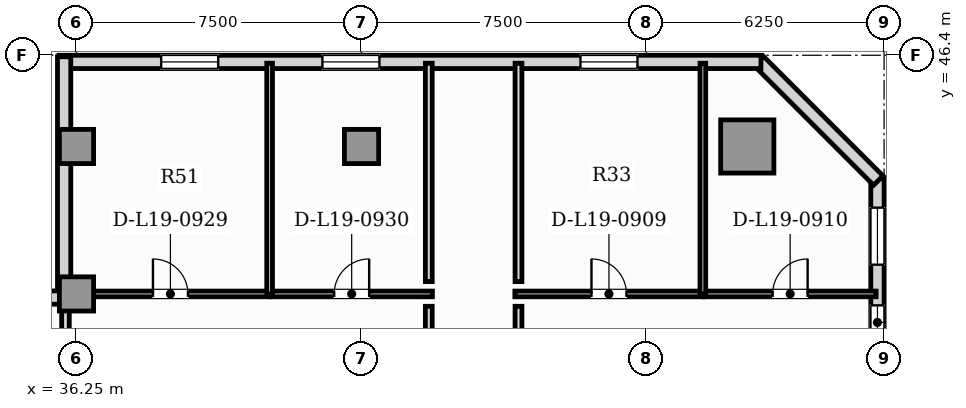
"""IFC4 building model, lengths in metres.
Left out: names, types, materials, properties, quantities, classifications, styles, units other than length and angle.
Written with IfcOpenShell. Run it as: python <this file> out.ifc"""

import sys

from ifc_helpers import new_model, si_unit, direction, frame, frame_2d, origin, origin_2d, place, context, subcontext, project, spatial, rectangle, hollow_rectangle, extrude, element, fill, save


model = new_model("IFC4")
c1 = context("Model", 3, precision=1e-05, world=origin(), true_north=direction((0.0, 1.0)))
c2 = subcontext(c1, "Body", "Model", "MODEL_VIEW")
j1 = project(units=[si_unit("LENGTHUNIT", "METRE"), si_unit("PLANEANGLEUNIT", "RADIAN")], contexts=[c1])
p1 = place(None, origin())
s1 = spatial("IfcSite", under=j1, at=p1, CompositionType="ELEMENT")
p2 = place(p1, origin())
s2 = spatial("IfcBuilding", under=s1, at=p2, CompositionType="ELEMENT")
p3 = place(p2, frame((0.0, 0.0, 81.05)))
s3 = spatial("IfcBuildingStorey", under=s2, at=p3, CompositionType="ELEMENT", Elevation=81.05)
p4 = place(p3, frame((53.9, 44.0, 0.0), z_axis=(0.0, 0.0, 1.0), x_axis=(1.0, 0.0, 0.0)))
e1 = element("IfcColumn", 1, at=p4, inside=s3, PredefinedType="USERDEFINED", context=c2, shape_type="SweptSolid", body=[
    extrude(hollow_rectangle(XDim=1.4, YDim=1.4, WallThickness=0.08, at=origin_2d()), origin(), (0.0, 0.0, 1.0), 3.85),
])
for number, where, z_axis, x_axis in (
    (2, (36.25, 44.0, 0.0), (0.0, 0.0, 1.0), (1.0, 0.0, 0.0)),
    (3, (43.75, 44.0, 0.0), (0.0, 0.0, 1.0), (1.0, 0.0, 0.0)),
    (4, (36.25, 40.12, 0.0), (0.0, 0.0, 1.0), (1.0, 0.0, 0.0)),
):
    element("IfcColumn", number, at=place(p3, frame(where, z_axis=z_axis, x_axis=x_axis)), inside=s3, PredefinedType="COLUMN", context=c2, shape_type="SweptSolid", body=[
        extrude(rectangle(XDim=0.9, YDim=0.9, at=origin_2d()), origin(), (0.0, 0.0, 1.0), 3.85),
    ])
p5 = place(p3, frame((57.325, 3.24, 0.0), z_axis=(0.0, 0.0, 1.0), x_axis=(0.0, 1.0, 0.0)))
e5 = element("IfcWall", 5, at=p5, inside=s3, PredefinedType="SOLIDWALL", context=c2, shape_type="SweptSolid", body=[
    extrude(rectangle(XDim=39.92, YDim=0.35, at=frame_2d((19.96, 0.0))), origin(), (0.0, 0.0, 1.0), 3.6),
])
p6 = place(p5, frame((35.68, 0.0, 0.95)))
e6 = element("IfcOpeningElement", 6, at=p6, cuts=e5, PredefinedType="OPENING", context=c2, shape_type="SweptSolid", body=[
    extrude(rectangle(XDim=0.9, YDim=1.5, at=frame_2d((0.45, 0.75))), frame((0.0, 0.185, 0.0), z_axis=(0.0, -1.0, 0.0), x_axis=(1.0, 0.0, 0.0)), (0.0, 0.0, 1.0), 0.37),
])
p7 = place(p5, frame((11.882, 0.0, 0.9)))
e7 = element("IfcOpeningElement", 7, at=p7, cuts=e5, PredefinedType="OPENING", context=c2, shape_type="SweptSolid", body=[
    extrude(rectangle(XDim=1.5, YDim=1.95, at=frame_2d((0.75, 0.975))), frame((0.0, 0.185, 0.0), z_axis=(0.0, -1.0, 0.0), x_axis=(1.0, 0.0, 0.0)), (0.0, 0.0, 1.0), 0.37),
])
p8 = place(p5, frame((18.512, 0.0, 0.9)))
e8 = element("IfcOpeningElement", 8, at=p8, cuts=e5, PredefinedType="OPENING", context=c2, shape_type="SweptSolid", body=[
    extrude(rectangle(XDim=1.5, YDim=1.95, at=frame_2d((0.75, 0.975))), frame((0.0, 0.185, 0.0), z_axis=(0.0, -1.0, 0.0), x_axis=(1.0, 0.0, 0.0)), (0.0, 0.0, 1.0), 0.37),
])
p9 = place(p5, frame((28.834, 0.0, 0.9)))
e9 = element("IfcOpeningElement", 9, at=p9, cuts=e5, PredefinedType="OPENING", context=c2, shape_type="SweptSolid", body=[
    extrude(rectangle(XDim=1.5, YDim=1.95, at=frame_2d((0.75, 0.975))), frame((0.0, 0.185, 0.0), z_axis=(0.0, -1.0, 0.0), x_axis=(1.0, 0.0, 0.0)), (0.0, 0.0, 1.0), 0.37),
])
p10 = place(p5, frame((37.65, 0.0, 0.9)))
e10 = element("IfcOpeningElement", 10, at=p10, cuts=e5, PredefinedType="OPENING", context=c2, shape_type="SweptSolid", body=[
    extrude(rectangle(XDim=1.5, YDim=1.95, at=frame_2d((0.75, 0.975))), frame((0.0, 0.185, 0.0), z_axis=(0.0, -1.0, 0.0), x_axis=(1.0, 0.0, 0.0)), (0.0, 0.0, 1.0), 0.37),
])
p11 = place(p3, frame((57.348, 43.104, 0.0), z_axis=(0.0, 0.0, 1.0), x_axis=(-0.707079321262, 0.707134240044, 0.0)))
e11 = element("IfcWall", 11, at=p11, inside=s3, PredefinedType="SOLIDWALL", context=c2, shape_type="SweptSolid", body=[
    extrude(rectangle(XDim=4.446, YDim=0.35, at=frame_2d((2.223, 0.0))), origin(), (0.0, 0.0, 1.0), 3.6),
])
p12 = place(p3, frame((54.26, 46.225, 0.0), z_axis=(0.0, 0.0, 1.0), x_axis=(-1.0, 0.0, 0.0)))
e12 = element("IfcWall", 12, at=p12, inside=s3, PredefinedType="SOLIDWALL", context=c2, shape_type="SweptSolid", body=[
    extrude(rectangle(XDim=18.47, YDim=0.35, at=frame_2d((9.235, 0.0))), origin(), (0.0, 0.0, 1.0), 3.6),
])
p13 = place(p12, frame((3.25, 0.0, 0.9)))
e13 = element("IfcOpeningElement", 13, at=p13, cuts=e12, PredefinedType="OPENING", context=c2, shape_type="SweptSolid", body=[
    extrude(rectangle(XDim=1.5, YDim=1.95, at=frame_2d((0.75, 0.975))), frame((0.0, 0.185, 0.0), z_axis=(0.0, -1.0, 0.0), x_axis=(1.0, 0.0, 0.0)), (0.0, 0.0, 1.0), 0.37),
])
p14 = place(p12, frame((14.282, 0.0, 0.9)))
e14 = element("IfcOpeningElement", 14, at=p14, cuts=e12, PredefinedType="OPENING", context=c2, shape_type="SweptSolid", body=[
    extrude(rectangle(XDim=1.5, YDim=1.95, at=frame_2d((0.75, 0.975))), frame((0.0, 0.185, 0.0), z_axis=(0.0, -1.0, 0.0), x_axis=(1.0, 0.0, 0.0)), (0.0, 0.0, 1.0), 0.37),
])
p15 = place(p12, frame((10.039, 0.0, 0.9)))
e15 = element("IfcOpeningElement", 15, at=p15, cuts=e12, PredefinedType="OPENING", context=c2, shape_type="SweptSolid", body=[
    extrude(rectangle(XDim=1.5, YDim=1.95, at=frame_2d((0.75, 0.975))), frame((0.0, 0.185, 0.0), z_axis=(0.0, -1.0, 0.0), x_axis=(1.0, 0.0, 0.0)), (0.0, 0.0, 1.0), 0.37),
])
p16 = place(p3, frame((35.925, 46.36, 0.0), z_axis=(0.0, 0.0, 1.0), x_axis=(0.0, -1.0, 0.0)))
e16 = element("IfcWall", 16, at=p16, inside=s3, PredefinedType="SOLIDWALL", context=c2, shape_type="SweptSolid", body=[
    extrude(rectangle(XDim=6.16, YDim=0.35, at=frame_2d((3.08, 0.0))), origin(), (0.0, 0.0, 1.0), 3.6),
])
p17 = place(p3, frame((34.25, 40.025, 0.0), z_axis=(0.0, 0.0, 1.0), x_axis=(1.0, 0.0, 0.0)))
e17 = element("IfcWall", 17, at=p17, inside=s3, PredefinedType="SOLIDWALL", context=c2, shape_type="SweptSolid", body=[
    extrude(rectangle(XDim=1.85, YDim=0.35, at=frame_2d((0.925, 0.0))), origin(), (0.0, 0.0, 1.0), 3.6),
])
p18 = place(p3, frame((47.785, 40.12, 0.0), z_axis=(0.0, 0.0, 1.0), x_axis=(1.0, 0.0, 0.0)))
e18 = element("IfcWall", 18, at=p18, inside=s3, PredefinedType="PARTITIONING", context=c2, shape_type="SweptSolid", body=[
    extrude(rectangle(XDim=4.951, YDim=0.15, at=frame_2d((2.476, 0.0))), origin(), (0.0, 0.0, 1.0), 3.6),
])
p19 = place(p18, frame((2.016, 0.0, 0.0)))
e19 = element("IfcOpeningElement", 19, at=p19, cuts=e18, PredefinedType="OPENING", context=c2, shape_type="SweptSolid", body=[
    extrude(rectangle(XDim=0.92, YDim=2.1, at=frame_2d((0.46, 1.05))), frame((0.0, 0.085, 0.0), z_axis=(0.0, -1.0, 0.0), x_axis=(1.0, 0.0, 0.0)), (0.0, 0.0, 1.0), 0.17),
])
p20 = place(p3, frame((52.766, 40.12, 0.0), z_axis=(0.0, 0.0, 1.0), x_axis=(1.0, 0.0, 0.0)))
e20 = element("IfcWall", 20, at=p20, inside=s3, PredefinedType="PARTITIONING", context=c2, shape_type="SweptSolid", body=[
    extrude(rectangle(XDim=4.524, YDim=0.15, at=frame_2d((2.262, 0.0))), origin(), (0.0, 0.0, 1.0), 3.6),
])
p21 = place(p20, frame((1.802, 0.0, 0.0)))
e21 = element("IfcOpeningElement", 21, at=p21, cuts=e20, PredefinedType="OPENING", context=c2, shape_type="SweptSolid", body=[
    extrude(rectangle(XDim=0.92, YDim=2.1, at=frame_2d((0.46, 1.05))), frame((0.0, 0.085, 0.0), z_axis=(0.0, -1.0, 0.0), x_axis=(1.0, 0.0, 0.0)), (0.0, 0.0, 1.0), 0.17),
])
p22 = place(p3, frame((52.731, 40.115, 0.0), z_axis=(0.0, 0.0, 1.0), x_axis=(0.0, 1.0, 0.0)))
e22 = element("IfcWall", 22, at=p22, inside=s3, PredefinedType="PARTITIONING", context=c2, shape_type="SweptSolid", body=[
    extrude(rectangle(XDim=6.075, YDim=0.15, at=frame_2d((3.038, 0.0))), origin(), (0.0, 0.0, 1.0), 3.6),
])
p23 = place(p3, frame((36.107, 40.12, 0.0), z_axis=(0.0, 0.0, 1.0), x_axis=(1.0, 0.0, 0.0)))
e23 = element("IfcWall", 23, at=p23, inside=s3, PredefinedType="PARTITIONING", context=c2, shape_type="SweptSolid", body=[
    extrude(rectangle(XDim=5.23, YDim=0.15, at=frame_2d((2.615, 0.0))), origin(), (0.0, 0.0, 1.0), 3.6),
])
p24 = place(p23, frame((2.155, 0.0, 0.0)))
e24 = element("IfcOpeningElement", 24, at=p24, cuts=e23, PredefinedType="OPENING", context=c2, shape_type="SweptSolid", body=[
    extrude(rectangle(XDim=0.92, YDim=2.1, at=frame_2d((0.46, 1.05))), frame((0.0, 0.085, 0.0), z_axis=(0.0, -1.0, 0.0), x_axis=(1.0, 0.0, 0.0)), (0.0, 0.0, 1.0), 0.17),
])
p25 = place(p3, frame((41.366, 40.12, 0.0), z_axis=(0.0, 0.0, 1.0), x_axis=(1.0, 0.0, 0.0)))
e25 = element("IfcWall", 25, at=p25, inside=s3, PredefinedType="PARTITIONING", context=c2, shape_type="SweptSolid", body=[
    extrude(rectangle(XDim=4.249, YDim=0.15, at=frame_2d((2.124, 0.0))), origin(), (0.0, 0.0, 1.0), 3.6),
])
p26 = place(p25, frame((1.664, 0.0, 0.0)))
e26 = element("IfcOpeningElement", 26, at=p26, cuts=e25, PredefinedType="OPENING", context=c2, shape_type="SweptSolid", body=[
    extrude(rectangle(XDim=0.92, YDim=2.1, at=frame_2d((0.46, 1.05))), frame((0.0, 0.085, 0.0), z_axis=(0.0, -1.0, 0.0), x_axis=(1.0, 0.0, 0.0)), (0.0, 0.0, 1.0), 0.17),
])
p27 = place(p3, frame((35.96, 38.615, 0.0), z_axis=(0.0, 0.0, 1.0), x_axis=(0.0, 1.0, 0.0)))
e27 = element("IfcWall", 27, at=p27, inside=s3, PredefinedType="PARTITIONING", context=c2, shape_type="SweptSolid", body=[
    extrude(rectangle(XDim=1.375, YDim=0.2, at=frame_2d((0.688, 0.0))), origin(), (0.0, 0.0, 1.0), 3.6),
])
p28 = place(p3, frame((41.332, 40.115, 0.0), z_axis=(0.0, 0.0, 1.0), x_axis=(0.0, 1.0, 0.0)))
e28 = element("IfcWall", 28, at=p28, inside=s3, PredefinedType="PARTITIONING", context=c2, shape_type="SweptSolid", body=[
    extrude(rectangle(XDim=6.075, YDim=0.15, at=frame_2d((3.038, 0.0))), origin(), (0.0, 0.0, 1.0), 3.6),
])
p29 = place(p3, frame((47.88, 38.945, 0.0), z_axis=(0.0, 0.0, 1.0), x_axis=(0.0, 1.0, 0.0)))
e29 = element("IfcWall", 29, at=p29, inside=s3, PredefinedType="PARTITIONING", context=c2, shape_type="SweptSolid", body=[
    extrude(rectangle(XDim=0.85, YDim=0.18, at=frame_2d((0.425, 0.0))), origin(), (0.0, 0.0, 1.0), 3.6),
])
p30 = place(p3, frame((47.88, 40.445, 0.0), z_axis=(0.0, 0.0, 1.0), x_axis=(0.0, 1.0, 0.0)))
e30 = element("IfcWall", 30, at=p30, inside=s3, PredefinedType="PARTITIONING", context=c2, shape_type="SweptSolid", body=[
    extrude(rectangle(XDim=5.745, YDim=0.18, at=frame_2d((2.873, 0.0))), origin(), (0.0, 0.0, 1.0), 3.6),
])
p31 = place(p3, frame((45.52, 39.795, 0.0), z_axis=(0.0, 0.0, 1.0), x_axis=(0.0, -1.0, 0.0)))
e31 = element("IfcWall", 31, at=p31, inside=s3, PredefinedType="PARTITIONING", context=c2, shape_type="SweptSolid", body=[
    extrude(rectangle(XDim=0.85, YDim=0.18, at=frame_2d((0.425, 0.0))), origin(), (0.0, 0.0, 1.0), 3.6),
])
p32 = place(p3, frame((45.52, 46.19, 0.0), z_axis=(0.0, 0.0, 1.0), x_axis=(0.0, -1.0, 0.0)))
e32 = element("IfcWall", 32, at=p32, inside=s3, PredefinedType="PARTITIONING", context=c2, shape_type="SweptSolid", body=[
    extrude(rectangle(XDim=5.745, YDim=0.18, at=frame_2d((2.873, 0.0))), origin(), (0.0, 0.0, 1.0), 3.6),
])
p33 = place(p6, origin())
e33 = element("IfcWindow", 33, at=p33, inside=s3, PartitioningType="SINGLE_PANEL", PredefinedType="WINDOW", context=c2, shape_type="SweptSolid", body=[
    extrude(rectangle(XDim=0.9, YDim=1.5, at=frame_2d((0.45, 0.75))), frame((0.0, 0.03, 0.0), z_axis=(0.0, -1.0, 0.0), x_axis=(1.0, 0.0, 0.0)), (0.0, 0.0, 1.0), 0.06),
])
fill(e6, e33)
p34 = place(p13, origin())
e34 = element("IfcWindow", 34, at=p34, inside=s3, PartitioningType="SINGLE_PANEL", PredefinedType="WINDOW", context=c2, shape_type="SweptSolid", body=[
    extrude(rectangle(XDim=1.5, YDim=1.95, at=frame_2d((0.75, 0.975))), frame((0.0, 0.03, 0.0), z_axis=(0.0, -1.0, 0.0), x_axis=(1.0, 0.0, 0.0)), (0.0, 0.0, 1.0), 0.06),
])
fill(e13, e34)
p35 = place(p10, origin())
e35 = element("IfcWindow", 35, at=p35, inside=s3, PartitioningType="SINGLE_PANEL", PredefinedType="WINDOW", context=c2, shape_type="SweptSolid", body=[
    extrude(rectangle(XDim=1.5, YDim=1.95, at=frame_2d((0.75, 0.975))), frame((0.0, 0.03, 0.0), z_axis=(0.0, -1.0, 0.0), x_axis=(1.0, 0.0, 0.0)), (0.0, 0.0, 1.0), 0.06),
])
fill(e10, e35)
p36 = place(p14, origin())
e36 = element("IfcWindow", 36, at=p36, inside=s3, PartitioningType="SINGLE_PANEL", PredefinedType="WINDOW", context=c2, shape_type="SweptSolid", body=[
    extrude(rectangle(XDim=1.5, YDim=1.95, at=frame_2d((0.75, 0.975))), frame((0.0, 0.03, 0.0), z_axis=(0.0, -1.0, 0.0), x_axis=(1.0, 0.0, 0.0)), (0.0, 0.0, 1.0), 0.06),
])
fill(e14, e36)
p37 = place(p15, origin())
e37 = element("IfcWindow", 37, at=p37, inside=s3, PartitioningType="SINGLE_PANEL", PredefinedType="WINDOW", context=c2, shape_type="SweptSolid", body=[
    extrude(rectangle(XDim=1.5, YDim=1.95, at=frame_2d((0.75, 0.975))), frame((0.0, 0.03, 0.0), z_axis=(0.0, -1.0, 0.0), x_axis=(1.0, 0.0, 0.0)), (0.0, 0.0, 1.0), 0.06),
])
fill(e15, e37)
p38 = place(p19, origin())
e38 = element("IfcDoor", 38, at=p38, inside=s3, OperationType="SINGLE_SWING_LEFT", PredefinedType="DOOR", context=c2, shape_type="SweptSolid", body=[
    extrude(rectangle(XDim=0.92, YDim=2.1, at=frame_2d((0.46, 1.05))), frame((0.0, 0.025, 0.0), z_axis=(0.0, -1.0, 0.0), x_axis=(1.0, 0.0, 0.0)), (0.0, 0.0, 1.0), 0.05),
])
fill(e19, e38)
p39 = place(p21, origin())
e39 = element("IfcDoor", 39, at=p39, inside=s3, OperationType="SINGLE_SWING_RIGHT", PredefinedType="DOOR", context=c2, shape_type="SweptSolid", body=[
    extrude(rectangle(XDim=0.92, YDim=2.1, at=frame_2d((0.46, 1.05))), frame((0.0, 0.025, 0.0), z_axis=(0.0, -1.0, 0.0), x_axis=(1.0, 0.0, 0.0)), (0.0, 0.0, 1.0), 0.05),
])
fill(e21, e39)
p40 = place(p24, origin())
e40 = element("IfcDoor", 40, at=p40, inside=s3, OperationType="SINGLE_SWING_LEFT", PredefinedType="DOOR", context=c2, shape_type="SweptSolid", body=[
    extrude(rectangle(XDim=0.92, YDim=2.1, at=frame_2d((0.46, 1.05))), frame((0.0, 0.025, 0.0), z_axis=(0.0, -1.0, 0.0), x_axis=(1.0, 0.0, 0.0)), (0.0, 0.0, 1.0), 0.05),
])
fill(e24, e40)
p41 = place(p26, origin())
e41 = element("IfcDoor", 41, at=p41, inside=s3, OperationType="SINGLE_SWING_RIGHT", PredefinedType="DOOR", context=c2, shape_type="SweptSolid", body=[
    extrude(rectangle(XDim=0.92, YDim=2.1, at=frame_2d((0.46, 1.05))), frame((0.0, 0.025, 0.0), z_axis=(0.0, -1.0, 0.0), x_axis=(1.0, 0.0, 0.0)), (0.0, 0.0, 1.0), 0.05),
])
fill(e26, e41)
save(model, sys.argv[1])
